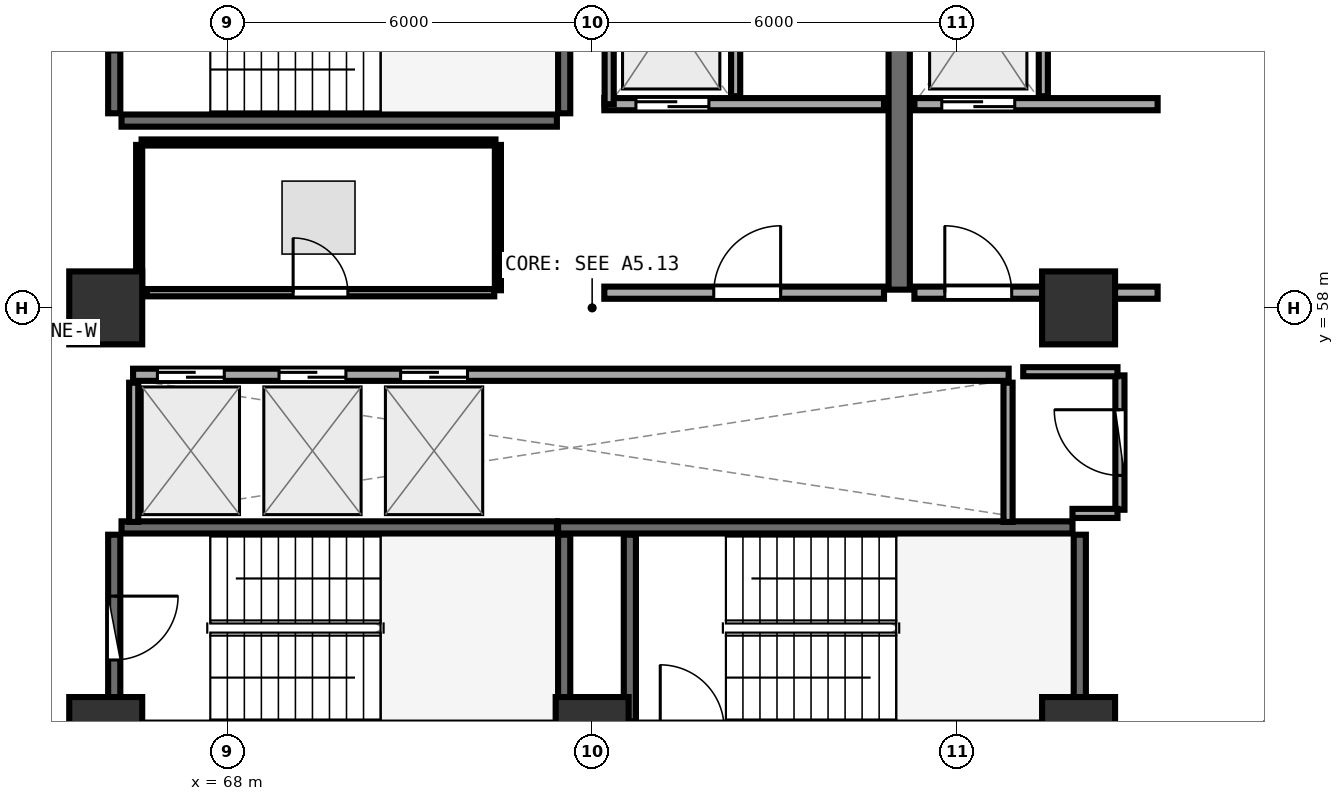
"""IFC4 building model, lengths in metres.
Left out: names, types, materials, properties, quantities, classifications, styles, units other than length and angle.
Written with IfcOpenShell. Run it as: python <this file> out.ifc"""

import sys

from ifc_helpers import new_model, si_unit, direction, frame, frame_2d, origin, origin_2d, place, context, subcontext, project, spatial, rectangle, extrude, element, fill, save


model = new_model("IFC4")
c1 = context("Model", 3, precision=1e-05, world=origin(), true_north=direction((0.0, 1.0)))
c2 = subcontext(c1, "Body", "Model", "MODEL_VIEW")
j1 = project(units=[si_unit("LENGTHUNIT", "METRE"), si_unit("PLANEANGLEUNIT", "RADIAN")], contexts=[c1])
p1 = place(None, origin())
s1 = spatial("IfcSite", under=j1, at=p1, CompositionType="ELEMENT")
p2 = place(p1, origin())
s2 = spatial("IfcBuilding", under=s1, at=p2, CompositionType="ELEMENT")
p3 = place(p2, frame((0.0, 0.0, 158.1)))
s3 = spatial("IfcBuildingStorey", under=s2, at=p3, CompositionType="ELEMENT", Elevation=158.1)
for number, where, z_axis, x_axis in (
    (1, (66.0, 51.0, 0.0), (0.0, 0.0, 1.0), (1.0, 0.0, 0.0)),
    (2, (74.0, 51.0, 0.0), (0.0, 0.0, 1.0), (1.0, 0.0, 0.0)),
    (3, (82.0, 51.0, 0.0), (0.0, 0.0, 1.0), (1.0, 0.0, 0.0)),
    (4, (82.0, 58.0, 0.0), (0.0, 0.0, 1.0), (1.0, 0.0, 0.0)),
    (5, (66.0, 58.0, 0.0), (0.0, 0.0, 1.0), (1.0, 0.0, 0.0)),
):
    element("IfcColumn", number, at=place(p3, frame(where, z_axis=z_axis, x_axis=x_axis)), inside=s3, PredefinedType="PILASTER", context=c2, shape_type="SweptSolid", body=[
        extrude(rectangle(XDim=1.2, YDim=1.2, at=origin_2d()), origin(), (0.0, 0.0, 1.0), 3.75),
    ])
p4 = place(p3, frame((66.26, 61.08, 0.0), z_axis=(0.0, 0.0, 1.0), x_axis=(1.0, 0.0, 0.0)))
e6 = element("IfcWall", 6, at=p4, inside=s3, PredefinedType="SHEAR", context=c2, shape_type="SweptSolid", body=[
    extrude(rectangle(XDim=7.16, YDim=0.2, at=frame_2d((3.58, 0.0))), origin(), (0.0, 0.0, 1.0), 3.49),
])
p5 = place(p3, frame((73.54, 61.2, 0.0), z_axis=(0.0, 0.0, 1.0), x_axis=(0.0, 1.0, 0.0)))
e7 = element("IfcWall", 7, at=p5, inside=s3, PredefinedType="SHEAR", context=c2, shape_type="SweptSolid", body=[
    extrude(rectangle(XDim=3.07, YDim=0.2, at=frame_2d((1.535, 0.0))), origin(), (0.0, 0.0, 1.0), 3.49),
])
p6 = place(p3, frame((66.14, 64.27, 0.0), z_axis=(0.0, 0.0, 1.0), x_axis=(0.0, -1.0, 0.0)))
e8 = element("IfcWall", 8, at=p6, inside=s3, PredefinedType="SHEAR", context=c2, shape_type="SweptSolid", body=[
    extrude(rectangle(XDim=3.07, YDim=0.2, at=frame_2d((1.535, 0.0))), origin(), (0.0, 0.0, 1.0), 3.49),
])
p7 = place(p6, frame((1.01, 0.0, 0.0)))
e9 = element("IfcOpeningElement", 9, at=p7, cuts=e8, PredefinedType="OPENING", context=c2, shape_type="SweptSolid", body=[
    extrude(rectangle(XDim=1.05, YDim=2.1, at=frame_2d((0.525, 1.05))), frame((0.0, 0.11, 0.0), z_axis=(0.0, -1.0, 0.0), x_axis=(1.0, 0.0, 0.0)), (0.0, 0.0, 1.0), 0.22),
])
p8 = place(p3, frame((82.02, 51.2, 0.0), z_axis=(0.0, 0.0, 1.0), x_axis=(0.0, 1.0, 0.0)))
e10 = element("IfcWall", 10, at=p8, inside=s3, PredefinedType="SHEAR", context=c2, shape_type="SweptSolid", body=[
    extrude(rectangle(XDim=3.07, YDim=0.2, at=frame_2d((1.535, 0.0))), origin(), (0.0, 0.0, 1.0), 3.49),
])
p9 = place(p3, frame((81.9, 54.39, 0.0), z_axis=(0.0, 0.0, 1.0), x_axis=(-1.0, 0.0, 0.0)))
e11 = element("IfcWall", 11, at=p9, inside=s3, PredefinedType="SHEAR", context=c2, shape_type="SweptSolid", body=[
    extrude(rectangle(XDim=8.46, YDim=0.2, at=frame_2d((4.23, 0.0))), origin(), (0.0, 0.0, 1.0), 3.49),
])
for number, where, z_axis, x_axis in (
    (12, (74.62, 54.27, 0.0), (0.0, 0.0, 1.0), (0.0, -1.0, 0.0)),
    (13, (73.54, 51.2, 0.0), (0.0, 0.0, 1.0), (0.0, 1.0, 0.0)),
):
    element("IfcWall", number, at=place(p3, frame(where, z_axis=z_axis, x_axis=x_axis)), inside=s3, PredefinedType="SHEAR", context=c2, shape_type="SweptSolid", body=[
        extrude(rectangle(XDim=3.07, YDim=0.2, at=frame_2d((1.535, 0.0))), origin(), (0.0, 0.0, 1.0), 3.49),
    ])
p10 = place(p3, frame((73.42, 54.39, 0.0), z_axis=(0.0, 0.0, 1.0), x_axis=(-1.0, 0.0, 0.0)))
e14 = element("IfcWall", 14, at=p10, inside=s3, PredefinedType="SHEAR", context=c2, shape_type="SweptSolid", body=[
    extrude(rectangle(XDim=7.16, YDim=0.2, at=frame_2d((3.58, 0.0))), origin(), (0.0, 0.0, 1.0), 3.49),
])
p11 = place(p3, frame((66.14, 54.27, 0.0), z_axis=(0.0, 0.0, 1.0), x_axis=(0.0, -1.0, 0.0)))
e15 = element("IfcWall", 15, at=p11, inside=s3, PredefinedType="SHEAR", context=c2, shape_type="SweptSolid", body=[
    extrude(rectangle(XDim=3.07, YDim=0.2, at=frame_2d((1.535, 0.0))), origin(), (0.0, 0.0, 1.0), 3.49),
])
p12 = place(p11, frame((1.01, 0.0, 0.0)))
e16 = element("IfcOpeningElement", 16, at=p12, cuts=e15, PredefinedType="OPENING", context=c2, shape_type="SweptSolid", body=[
    extrude(rectangle(XDim=1.05, YDim=2.1, at=frame_2d((0.525, 1.05))), frame((0.0, 0.11, 0.0), z_axis=(0.0, -1.0, 0.0), x_axis=(1.0, 0.0, 0.0)), (0.0, 0.0, 1.0), 0.22),
])
p13 = place(p3, frame((79.05, 58.3, 0.0), z_axis=(0.0, 0.0, 1.0), x_axis=(0.0, 1.0, 0.0)))
e17 = element("IfcWall", 17, at=p13, inside=s3, PredefinedType="SHEAR", context=c2, shape_type="SweptSolid", body=[
    extrude(rectangle(XDim=6.3, YDim=0.35, at=frame_2d((3.15, 0.0))), origin(), (0.0, 0.0, 1.0), 3.49),
])
p14 = place(p3, frame((74.2, 61.35, 0.0), z_axis=(0.0, 0.0, 1.0), x_axis=(1.0, 0.0, 0.0)))
e18 = element("IfcWall", 18, at=p14, inside=s3, PredefinedType="SOLIDWALL", context=c2, shape_type="SweptSolid", body=[
    extrude(rectangle(XDim=4.6, YDim=0.2, at=frame_2d((2.3, 0.0))), origin(), (0.0, 0.0, 1.0), 3.48),
])
p15 = place(p14, frame((0.52, 0.0, 0.0)))
e19 = element("IfcOpeningElement", 19, at=p15, cuts=e18, PredefinedType="OPENING", context=c2, shape_type="SweptSolid", body=[
    extrude(rectangle(XDim=1.2, YDim=2.15, at=frame_2d((0.6, 1.075))), frame((0.0, 0.11, 0.0), z_axis=(0.0, -1.0, 0.0), x_axis=(1.0, 0.0, 0.0)), (0.0, 0.0, 1.0), 0.22),
])
p16 = place(p3, frame((74.28, 61.35, 0.0), z_axis=(0.0, 0.0, 1.0), x_axis=(0.0, 1.0, 0.0)))
e20 = element("IfcWall", 20, at=p16, inside=s3, PredefinedType="PARTITIONING", context=c2, shape_type="SweptSolid", body=[
    extrude(rectangle(XDim=2.97, YDim=0.15, at=frame_2d((1.485, 0.0))), origin(), (0.0, 0.0, 1.0), 3.48),
])
p17 = place(p3, frame((76.36, 61.48, 0.0), z_axis=(0.0, 0.0, 1.0), x_axis=(0.0, 1.0, 0.0)))
e21 = element("IfcWall", 21, at=p17, inside=s3, PredefinedType="PARTITIONING", context=c2, shape_type="SweptSolid", body=[
    extrude(rectangle(XDim=2.84, YDim=0.15, at=frame_2d((1.42, 0.0))), origin(), (0.0, 0.0, 1.0), 3.48),
])
p18 = place(p3, frame((79.3, 61.35, 0.0), z_axis=(0.0, 0.0, 1.0), x_axis=(1.0, 0.0, 0.0)))
e22 = element("IfcWall", 22, at=p18, inside=s3, PredefinedType="SOLIDWALL", context=c2, shape_type="SweptSolid", body=[
    extrude(rectangle(XDim=4.0, YDim=0.2, at=frame_2d((2.0, 0.0))), origin(), (0.0, 0.0, 1.0), 2.775),
])
p19 = place(p18, frame((0.45, 0.0, 0.0)))
e23 = element("IfcOpeningElement", 23, at=p19, cuts=e22, PredefinedType="OPENING", context=c2, shape_type="SweptSolid", body=[
    extrude(rectangle(XDim=1.2, YDim=2.15, at=frame_2d((0.6, 1.075))), frame((0.0, 0.11, 0.0), z_axis=(0.0, -1.0, 0.0), x_axis=(1.0, 0.0, 0.0)), (0.0, 0.0, 1.0), 0.22),
])
p20 = place(p3, frame((81.42, 61.48, 0.0), z_axis=(0.0, 0.0, 1.0), x_axis=(0.0, 1.0, 0.0)))
e24 = element("IfcWall", 24, at=p20, inside=s3, PredefinedType="PARTITIONING", context=c2, shape_type="SweptSolid", body=[
    extrude(rectangle(XDim=2.84, YDim=0.15, at=frame_2d((1.42, 0.0))), origin(), (0.0, 0.0, 1.0), 3.48),
])
p21 = place(p3, frame((74.2, 58.25, 0.0), z_axis=(0.0, 0.0, 1.0), x_axis=(1.0, 0.0, 0.0)))
e25 = element("IfcWall", 25, at=p21, inside=s3, PredefinedType="SOLIDWALL", context=c2, shape_type="SweptSolid", body=[
    extrude(rectangle(XDim=4.6, YDim=0.2, at=frame_2d((2.3, 0.0))), origin(), (0.0, 0.0, 1.0), 3.48),
])
p22 = place(p21, frame((1.8, 0.0, 0.0)))
e26 = element("IfcOpeningElement", 26, at=p22, cuts=e25, PredefinedType="OPENING", context=c2, shape_type="SweptSolid", body=[
    extrude(rectangle(XDim=1.1, YDim=2.1, at=frame_2d((0.55, 1.05))), frame((0.0, 0.11, 0.0), z_axis=(0.0, -1.0, 0.0), x_axis=(1.0, 0.0, 0.0)), (0.0, 0.0, 1.0), 0.22),
])
p23 = place(p3, frame((79.3, 58.25, 0.0), z_axis=(0.0, 0.0, 1.0), x_axis=(1.0, 0.0, 0.0)))
e27 = element("IfcWall", 27, at=p23, inside=s3, PredefinedType="SOLIDWALL", context=c2, shape_type="SweptSolid", body=[
    extrude(rectangle(XDim=4.0, YDim=0.2, at=frame_2d((2.0, 0.0))), origin(), (0.0, 0.0, 1.0), 2.775),
])
p24 = place(p23, frame((0.5, 0.0, 0.0)))
e28 = element("IfcOpeningElement", 28, at=p24, cuts=e27, PredefinedType="OPENING", context=c2, shape_type="SweptSolid", body=[
    extrude(rectangle(XDim=1.1, YDim=2.1, at=frame_2d((0.55, 1.05))), frame((0.0, 0.11, 0.0), z_axis=(0.0, -1.0, 0.0), x_axis=(1.0, 0.0, 0.0)), (0.0, 0.0, 1.0), 0.22),
])
p25 = place(p3, frame((66.45, 56.9, 0.0), z_axis=(0.0, 0.0, 1.0), x_axis=(1.0, 0.0, 0.0)))
e29 = element("IfcWall", 29, at=p25, inside=s3, PredefinedType="SOLIDWALL", context=c2, shape_type="SweptSolid", body=[
    extrude(rectangle(XDim=14.4, YDim=0.2, at=frame_2d((7.2, 0.0))), origin(), (0.0, 0.0, 1.0), 3.48),
])
p26 = place(p25, frame((0.4, 0.0, 0.0)))
e30 = element("IfcOpeningElement", 30, at=p26, cuts=e29, PredefinedType="OPENING", context=c2, shape_type="SweptSolid", body=[
    extrude(rectangle(XDim=1.1, YDim=2.1, at=frame_2d((0.55, 1.05))), frame((0.0, 0.11, 0.0), z_axis=(0.0, -1.0, 0.0), x_axis=(1.0, 0.0, 0.0)), (0.0, 0.0, 1.0), 0.22),
])
p27 = place(p25, frame((2.4, 0.0, 0.0)))
e31 = element("IfcOpeningElement", 31, at=p27, cuts=e29, PredefinedType="OPENING", context=c2, shape_type="SweptSolid", body=[
    extrude(rectangle(XDim=1.1, YDim=2.1, at=frame_2d((0.55, 1.05))), frame((0.0, 0.11, 0.0), z_axis=(0.0, -1.0, 0.0), x_axis=(1.0, 0.0, 0.0)), (0.0, 0.0, 1.0), 0.22),
])
p28 = place(p25, frame((4.4, 0.0, 0.0)))
e32 = element("IfcOpeningElement", 32, at=p28, cuts=e29, PredefinedType="OPENING", context=c2, shape_type="SweptSolid", body=[
    extrude(rectangle(XDim=1.1, YDim=2.1, at=frame_2d((0.55, 1.05))), frame((0.0, 0.11, 0.0), z_axis=(0.0, -1.0, 0.0), x_axis=(1.0, 0.0, 0.0)), (0.0, 0.0, 1.0), 0.22),
])
for number, where, z_axis, x_axis in (
    (33, (66.46, 54.48, 0.0), (0.0, 0.0, 1.0), (0.0, 1.0, 0.0)),
    (34, (80.84, 54.48, 0.0), (0.0, 0.0, 1.0), (0.0, 1.0, 0.0)),
):
    element("IfcWall", number, at=place(p3, frame(where, z_axis=z_axis, x_axis=x_axis)), inside=s3, PredefinedType="PARTITIONING", context=c2, shape_type="SweptSolid", body=[
        extrude(rectangle(XDim=2.29, YDim=0.15, at=frame_2d((1.145, 0.0))), origin(), (0.0, 0.0, 1.0), 3.48),
    ])
p29 = place(p3, frame((82.68, 54.68, 0.0), z_axis=(0.0, 0.0, 1.0), x_axis=(0.0, 1.0, 0.0)))
e35 = element("IfcWall", 35, at=p29, inside=s3, PredefinedType="PARTITIONING", context=c2, shape_type="SweptSolid", body=[
    extrude(rectangle(XDim=2.21, YDim=0.15, at=frame_2d((1.105, 0.0))), origin(), (0.0, 0.0, 1.0), 3.48),
])
p30 = place(p29, frame((0.565, 0.0, 0.0)))
e36 = element("IfcOpeningElement", 36, at=p30, cuts=e35, PredefinedType="OPENING", context=c2, shape_type="SweptSolid", body=[
    extrude(rectangle(XDim=1.08, YDim=2.1, at=frame_2d((0.54, 1.05))), frame((0.0, 0.085, 0.0), z_axis=(0.0, -1.0, 0.0), x_axis=(1.0, 0.0, 0.0)), (0.0, 0.0, 1.0), 0.17),
])
p31 = place(p3, frame((66.675, 58.25, 0.0), z_axis=(0.0, 0.0, 1.0), x_axis=(1.0, 0.0, 0.0)))
e37 = element("IfcWall", 37, at=p31, inside=s3, PredefinedType="PARTITIONING", context=c2, shape_type="SweptSolid", body=[
    extrude(rectangle(XDim=5.715, YDim=0.12, at=frame_2d((2.857, 0.0))), origin(), (0.0, 0.0, 1.0), 3.48),
])
p32 = place(p31, frame((2.407, 0.0, 0.0)))
e38 = element("IfcOpeningElement", 38, at=p32, cuts=e37, PredefinedType="OPENING", context=c2, shape_type="SweptSolid", body=[
    extrude(rectangle(XDim=0.9, YDim=2.08, at=frame_2d((0.45, 1.04))), frame((0.0, 0.07, 0.0), z_axis=(0.0, -1.0, 0.0), x_axis=(1.0, 0.0, 0.0)), (0.0, 0.0, 1.0), 0.14),
])
p33 = place(p3, frame((81.9, 54.62, 0.0), z_axis=(0.0, 0.0, 1.0), x_axis=(1.0, 0.0, 0.0)))
e39 = element("IfcWall", 39, at=p33, inside=s3, PredefinedType="PARTITIONING", context=c2, shape_type="SweptSolid", body=[
    extrude(rectangle(XDim=0.74, YDim=0.15, at=frame_2d((0.37, 0.0))), origin(), (0.0, 0.0, 1.0), 2.775),
])
p34 = place(p3, frame((82.64, 56.95, 0.0), z_axis=(0.0, 0.0, 1.0), x_axis=(-1.0, 0.0, 0.0)))
e40 = element("IfcWall", 40, at=p34, inside=s3, PredefinedType="PARTITIONING", context=c2, shape_type="SweptSolid", body=[
    extrude(rectangle(XDim=1.55, YDim=0.15, at=frame_2d((0.775, 0.0))), origin(), (0.0, 0.0, 1.0), 2.775),
])
p35 = place(p3, frame((72.45, 58.29, 0.0), z_axis=(0.0, 0.0, 1.0), x_axis=(0.0, 1.0, 0.0)))
e41 = element("IfcWall", 41, at=p35, inside=s3, PredefinedType="PARTITIONING", context=c2, shape_type="SweptSolid", body=[
    extrude(rectangle(XDim=2.39, YDim=0.1, at=frame_2d((1.195, 0.0))), origin(), (0.0, 0.0, 1.0), 3.48),
])
p36 = place(p3, frame((72.41, 60.72, 0.0), z_axis=(0.0, 0.0, 1.0), x_axis=(-1.0, 0.0, 0.0)))
e42 = element("IfcWall", 42, at=p36, inside=s3, PredefinedType="PARTITIONING", context=c2, shape_type="SweptSolid", body=[
    extrude(rectangle(XDim=5.82, YDim=0.1, at=frame_2d((2.91, 0.0))), origin(), (0.0, 0.0, 1.0), 3.48),
])
p37 = place(p3, frame((66.55, 60.68, 0.0), z_axis=(0.0, 0.0, 1.0), x_axis=(0.0, -1.0, 0.0)))
e43 = element("IfcWall", 43, at=p37, inside=s3, PredefinedType="PARTITIONING", context=c2, shape_type="SweptSolid", body=[
    extrude(rectangle(XDim=2.383, YDim=0.1, at=frame_2d((1.191, 0.0))), origin(), (0.0, 0.0, 1.0), 3.48),
])
p38 = place(p3, frame((81.722, 47.699, 0.0), z_axis=(0.0, 0.0, 1.0), x_axis=(0.701417862724, 0.712750294179, 0.0)))
e44 = element("IfcWall", 44, at=p38, inside=s3, PredefinedType="PARTITIONING", context=c2, shape_type="SweptSolid", body=[
    extrude(rectangle(XDim=6.549, YDim=0.1, at=frame_2d((3.275, 0.0))), origin(), (0.0, 0.0, 1.0), 2.975),
])
p39 = place(p12, origin())
e45 = element("IfcDoor", 45, at=p39, inside=s3, OperationType="SINGLE_SWING_LEFT", PredefinedType="DOOR", context=c2, shape_type="SweptSolid", body=[
    extrude(rectangle(XDim=1.05, YDim=2.1, at=frame_2d((0.525, 1.05))), frame((0.0, 0.025, 0.0), z_axis=(0.0, -1.0, 0.0), x_axis=(1.0, 0.0, 0.0)), (0.0, 0.0, 1.0), 0.05),
])
fill(e16, e45)
p40 = place(p15, origin())
e46 = element("IfcDoor", 46, at=p40, inside=s3, OperationType="DOUBLE_DOOR_SLIDING", PredefinedType="DOOR", context=c2, shape_type="SweptSolid", body=[
    extrude(rectangle(XDim=1.2, YDim=2.15, at=frame_2d((0.6, 1.075))), frame((0.0, 0.025, 0.0), z_axis=(0.0, -1.0, 0.0), x_axis=(1.0, 0.0, 0.0)), (0.0, 0.0, 1.0), 0.05),
])
fill(e19, e46)
p41 = place(p19, origin())
e47 = element("IfcDoor", 47, at=p41, inside=s3, OperationType="DOUBLE_DOOR_SLIDING", PredefinedType="DOOR", context=c2, shape_type="SweptSolid", body=[
    extrude(rectangle(XDim=1.2, YDim=2.15, at=frame_2d((0.6, 1.075))), frame((0.0, 0.025, 0.0), z_axis=(0.0, -1.0, 0.0), x_axis=(1.0, 0.0, 0.0)), (0.0, 0.0, 1.0), 0.05),
])
fill(e23, e47)
p42 = place(p22, frame((1.1, 0.0, 0.0), z_axis=(0.0, 0.0, 1.0), x_axis=(-1.0, 0.0, 0.0)))
e48 = element("IfcDoor", 48, at=p42, inside=s3, OperationType="SINGLE_SWING_LEFT", PredefinedType="DOOR", context=c2, shape_type="SweptSolid", body=[
    extrude(rectangle(XDim=1.1, YDim=2.1, at=frame_2d((0.55, 1.05))), frame((0.0, 0.025, 0.0), z_axis=(0.0, -1.0, 0.0), x_axis=(1.0, 0.0, 0.0)), (0.0, 0.0, 1.0), 0.05),
])
fill(e26, e48)
p43 = place(p24, frame((1.1, 0.0, 0.0), z_axis=(0.0, 0.0, 1.0), x_axis=(-1.0, 0.0, 0.0)))
e49 = element("IfcDoor", 49, at=p43, inside=s3, OperationType="SINGLE_SWING_RIGHT", PredefinedType="DOOR", context=c2, shape_type="SweptSolid", body=[
    extrude(rectangle(XDim=1.1, YDim=2.1, at=frame_2d((0.55, 1.05))), frame((0.0, 0.025, 0.0), z_axis=(0.0, -1.0, 0.0), x_axis=(1.0, 0.0, 0.0)), (0.0, 0.0, 1.0), 0.05),
])
fill(e28, e49)
p44 = place(p26, origin())
e50 = element("IfcDoor", 50, at=p44, inside=s3, OperationType="DOUBLE_DOOR_SLIDING", PredefinedType="DOOR", context=c2, shape_type="SweptSolid", body=[
    extrude(rectangle(XDim=1.1, YDim=2.1, at=frame_2d((0.55, 1.05))), frame((0.0, 0.025, 0.0), z_axis=(0.0, -1.0, 0.0), x_axis=(1.0, 0.0, 0.0)), (0.0, 0.0, 1.0), 0.05),
])
fill(e30, e50)
p45 = place(p27, origin())
e51 = element("IfcDoor", 51, at=p45, inside=s3, OperationType="DOUBLE_DOOR_SLIDING", PredefinedType="DOOR", context=c2, shape_type="SweptSolid", body=[
    extrude(rectangle(XDim=1.1, YDim=2.1, at=frame_2d((0.55, 1.05))), frame((0.0, 0.025, 0.0), z_axis=(0.0, -1.0, 0.0), x_axis=(1.0, 0.0, 0.0)), (0.0, 0.0, 1.0), 0.05),
])
fill(e31, e51)
p46 = place(p28, origin())
e52 = element("IfcDoor", 52, at=p46, inside=s3, OperationType="DOUBLE_DOOR_SLIDING", PredefinedType="DOOR", context=c2, shape_type="SweptSolid", body=[
    extrude(rectangle(XDim=1.1, YDim=2.1, at=frame_2d((0.55, 1.05))), frame((0.0, 0.025, 0.0), z_axis=(0.0, -1.0, 0.0), x_axis=(1.0, 0.0, 0.0)), (0.0, 0.0, 1.0), 0.05),
])
fill(e32, e52)
p47 = place(p30, origin())
e53 = element("IfcDoor", 53, at=p47, inside=s3, OperationType="SINGLE_SWING_RIGHT", PredefinedType="DOOR", context=c2, shape_type="SweptSolid", body=[
    extrude(rectangle(XDim=1.08, YDim=2.1, at=frame_2d((0.54, 1.05))), frame((0.0, 0.025, 0.0), z_axis=(0.0, -1.0, 0.0), x_axis=(1.0, 0.0, 0.0)), (0.0, 0.0, 1.0), 0.05),
])
fill(e36, e53)
p48 = place(p32, origin())
e54 = element("IfcDoor", 54, at=p48, inside=s3, OperationType="SINGLE_SWING_LEFT", PredefinedType="DOOR", context=c2, shape_type="SweptSolid", body=[
    extrude(rectangle(XDim=0.9, YDim=2.08, at=frame_2d((0.45, 1.04))), frame((0.0, 0.025, 0.0), z_axis=(0.0, -1.0, 0.0), x_axis=(1.0, 0.0, 0.0)), (0.0, 0.0, 1.0), 0.05),
])
fill(e38, e54)
save(model, sys.argv[1])
